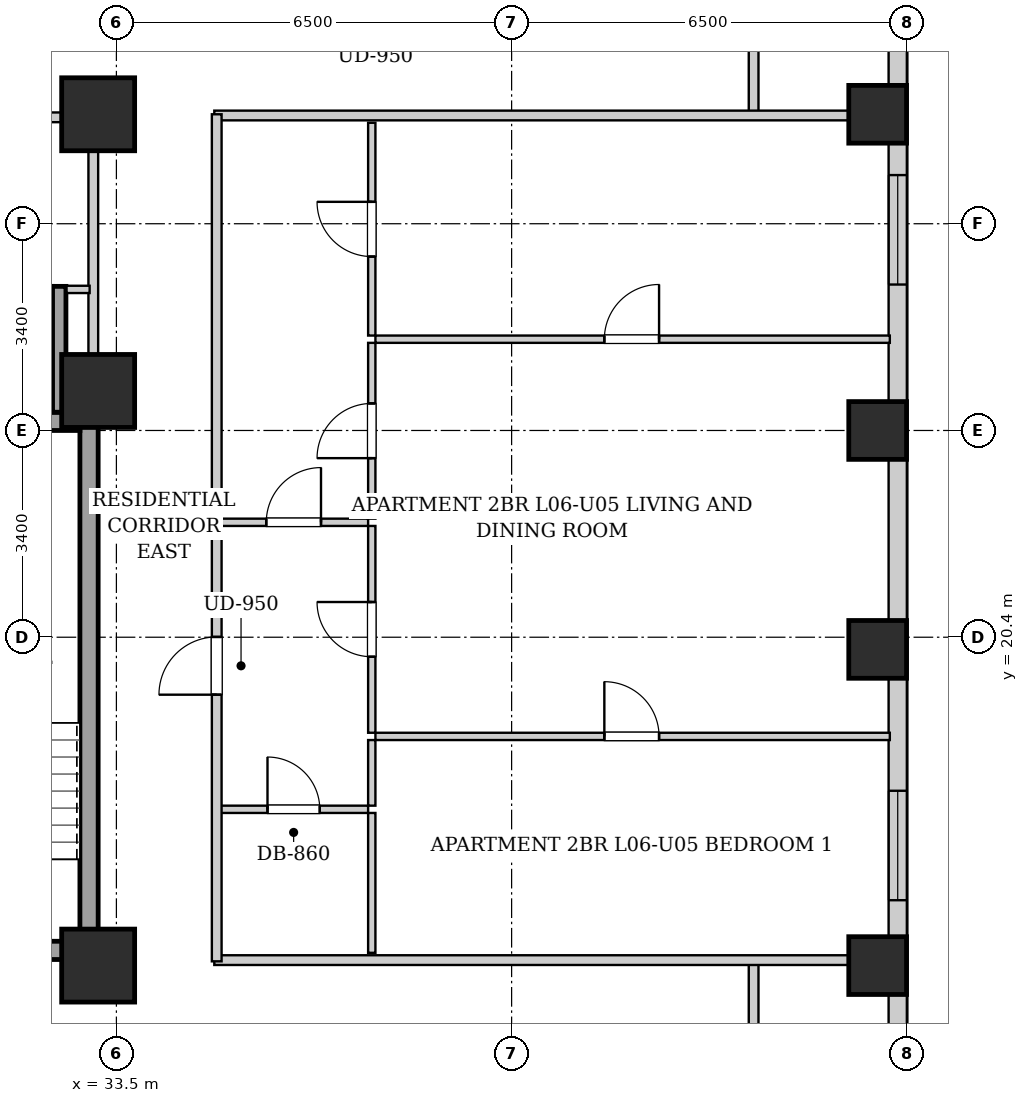
"""IFC4 building model, lengths in metres.
Left out: names, types, materials, properties, quantities, classifications, styles, units other than length and angle.
Written with IfcOpenShell. Run it as: python <this file> out.ifc"""

import sys

from ifc_helpers import new_model, si_unit, direction, frame, frame_2d, origin, origin_2d, place, context, subcontext, project, spatial, rectangle, extrude, element, fill, save


model = new_model("IFC4")
c1 = context("Model", 3, precision=1e-05, world=origin(), true_north=direction((0.0, 1.0)))
c2 = subcontext(c1, "Body", "Model", "MODEL_VIEW")
j1 = project(units=[si_unit("LENGTHUNIT", "METRE"), si_unit("PLANEANGLEUNIT", "RADIAN")], contexts=[c1])
p1 = place(None, origin())
s1 = spatial("IfcSite", under=j1, at=p1, CompositionType="ELEMENT")
p2 = place(p1, origin())
s2 = spatial("IfcBuilding", under=s1, at=p2, CompositionType="ELEMENT")
p3 = place(p2, frame((0.0, 0.0, 29.0)))
s3 = spatial("IfcBuildingStorey", under=s2, at=p3, CompositionType="ELEMENT", Elevation=29.0)
for number, where, z_axis, x_axis in (
    (1, (46.02, 15.0, 0.0), (0.0, 0.0, 1.0), (1.0, 0.0, 0.0)),
    (2, (46.02, 20.2, 0.0), (0.0, 0.0, 1.0), (1.0, 0.0, 0.0)),
    (3, (46.02, 23.8, 0.0), (0.0, 0.0, 1.0), (1.0, 0.0, 0.0)),
    (4, (46.02, 29.0, 0.0), (0.0, 0.0, 1.0), (1.0, 0.0, 0.0)),
):
    element("IfcColumn", number, at=place(p3, frame(where, z_axis=z_axis, x_axis=x_axis)), inside=s3, PredefinedType="COLUMN", context=c2, shape_type="SweptSolid", body=[
        extrude(rectangle(XDim=0.95, YDim=0.95, at=origin_2d()), origin(), (0.0, 0.0, 1.0), 3.2),
    ])
for number, where, z_axis, x_axis in (
    (5, (33.2, 15.0, 0.0), (0.0, 0.0, 1.0), (1.0, 0.0, 0.0)),
    (6, (33.2, 29.0, 0.0), (0.0, 0.0, 1.0), (1.0, 0.0, 0.0)),
    (7, (33.2, 24.45, 0.0), (0.0, 0.0, 1.0), (1.0, 0.0, 0.0)),
):
    element("IfcColumn", number, at=place(p3, frame(where, z_axis=z_axis, x_axis=x_axis)), inside=s3, PredefinedType="COLUMN", context=c2, shape_type="SweptSolid", body=[
        extrude(rectangle(XDim=1.2, YDim=1.2, at=origin_2d()), origin(), (0.0, 0.0, 1.0), 3.2),
    ])
p4 = place(p3, frame((46.35, 45.1, 0.0), z_axis=(0.0, 0.0, 1.0), x_axis=(0.0, -1.0, 0.0)))
e8 = element("IfcWall", 8, at=p4, inside=s3, PredefinedType="SOLIDWALL", context=c2, shape_type="SweptSolid", body=[
    extrude(rectangle(XDim=42.6, YDim=0.3, at=frame_2d((21.3, 0.0))), origin(), (0.0, 0.0, 1.0), 1.975),
])
p5 = place(p4, frame((37.575, 0.0, 0.55)))
e9 = element("IfcOpeningElement", 9, at=p5, cuts=e8, PredefinedType="OPENING", context=c2, shape_type="SweptSolid", body=[
    extrude(rectangle(XDim=1.8, YDim=1.2, at=frame_2d((0.9, 0.6))), frame((0.0, 0.16, 0.0), z_axis=(0.0, -1.0, 0.0), x_axis=(1.0, 0.0, 0.0)), (0.0, 0.0, 1.0), 0.32),
])
p6 = place(p4, frame((34.85, 0.0, 0.55)))
e10 = element("IfcOpeningElement", 10, at=p6, cuts=e8, PredefinedType="OPENING", context=c2, shape_type="SweptSolid", body=[
    extrude(rectangle(XDim=1.35, YDim=1.2, at=frame_2d((0.675, 0.6))), frame((0.0, 0.16, 0.0), z_axis=(0.0, -1.0, 0.0), x_axis=(1.0, 0.0, 0.0)), (0.0, 0.0, 1.0), 0.32),
])
p7 = place(p4, frame((3.665, 0.0, 0.55)))
e11 = element("IfcOpeningElement", 11, at=p7, cuts=e8, PredefinedType="OPENING", context=c2, shape_type="SweptSolid", body=[
    extrude(rectangle(XDim=1.8, YDim=1.2, at=frame_2d((0.9, 0.6))), frame((0.0, 0.16, 0.0), z_axis=(0.0, -1.0, 0.0), x_axis=(1.0, 0.0, 0.0)), (0.0, 0.0, 1.0), 0.32),
])
p8 = place(p4, frame((1.185, 0.0, 0.55)))
e12 = element("IfcOpeningElement", 12, at=p8, cuts=e8, PredefinedType="OPENING", context=c2, shape_type="SweptSolid", body=[
    extrude(rectangle(XDim=1.35, YDim=1.2, at=frame_2d((0.675, 0.6))), frame((0.0, 0.16, 0.0), z_axis=(0.0, -1.0, 0.0), x_axis=(1.0, 0.0, 0.0)), (0.0, 0.0, 1.0), 0.32),
])
p9 = place(p4, frame((27.225, 0.0, 0.55)))
e13 = element("IfcOpeningElement", 13, at=p9, cuts=e8, PredefinedType="OPENING", context=c2, shape_type="SweptSolid", body=[
    extrude(rectangle(XDim=1.8, YDim=1.2, at=frame_2d((0.9, 0.6))), frame((0.0, 0.16, 0.0), z_axis=(0.0, -1.0, 0.0), x_axis=(1.0, 0.0, 0.0)), (0.0, 0.0, 1.0), 0.32),
])
p10 = place(p4, frame((17.1, 0.0, 0.55)))
e14 = element("IfcOpeningElement", 14, at=p10, cuts=e8, PredefinedType="OPENING", context=c2, shape_type="SweptSolid", body=[
    extrude(rectangle(XDim=1.8, YDim=1.2, at=frame_2d((0.9, 0.6))), frame((0.0, 0.16, 0.0), z_axis=(0.0, -1.0, 0.0), x_axis=(1.0, 0.0, 0.0)), (0.0, 0.0, 1.0), 0.32),
])
p11 = place(p3, frame((33.05, 15.1, 0.0), z_axis=(0.0, 0.0, 1.0), x_axis=(0.0, 1.0, 0.0)))
e15 = element("IfcWall", 15, at=p11, inside=s3, PredefinedType="SHEAR", context=c2, shape_type="SweptSolid", body=[
    extrude(rectangle(XDim=9.0, YDim=0.3, at=frame_2d((4.5, 0.0))), origin(), (0.0, 0.0, 1.0), 2.94),
])
p12 = place(p3, frame((30.05, 23.95, 0.0), z_axis=(0.0, 0.0, 1.0), x_axis=(1.0, 0.0, 0.0)))
e16 = element("IfcWall", 16, at=p12, inside=s3, PredefinedType="SHEAR", context=c2, shape_type="SweptSolid", body=[
    extrude(rectangle(XDim=2.85, YDim=0.3, at=frame_2d((1.425, 0.0))), origin(), (0.0, 0.0, 1.0), 2.94),
])
p13 = place(p3, frame((30.05, 15.25, 0.0), z_axis=(0.0, 0.0, 1.0), x_axis=(1.0, 0.0, 0.0)))
e17 = element("IfcWall", 17, at=p13, inside=s3, PredefinedType="SHEAR", context=c2, shape_type="SweptSolid", body=[
    extrude(rectangle(XDim=2.85, YDim=0.3, at=frame_2d((1.425, 0.0))), origin(), (0.0, 0.0, 1.0), 2.94),
])
p14 = place(p13, frame((0.86, 0.0, 0.0)))
e18 = element("IfcOpeningElement", 18, at=p14, cuts=e17, PredefinedType="OPENING", context=c2, shape_type="SweptSolid", body=[
    extrude(rectangle(XDim=1.1, YDim=2.05, at=frame_2d((0.55, 1.025))), frame((0.0, 0.16, 0.0), z_axis=(0.0, -1.0, 0.0), x_axis=(1.0, 0.0, 0.0)), (0.0, 0.0, 1.0), 0.32),
])
p15 = place(p3, frame((32.56, 24.1, 0.0), z_axis=(0.0, 0.0, 1.0), x_axis=(0.0, 1.0, 0.0)))
e19 = element("IfcWall", 19, at=p15, inside=s3, PredefinedType="SHEAR", context=c2, shape_type="SweptSolid", body=[
    extrude(rectangle(XDim=2.07, YDim=0.22, at=frame_2d((1.035, 0.0))), origin(), (0.0, 0.0, 1.0), 2.94),
])
p16 = place(p3, frame((33.12, 24.12, 0.0), z_axis=(0.0, 0.0, 1.0), x_axis=(0.0, 1.0, 0.0)))
e20 = element("IfcWall", 20, at=p16, inside=s3, PredefinedType="PARTITIONING", context=c2, shape_type="SweptSolid", body=[
    extrude(rectangle(XDim=4.76, YDim=0.16, at=frame_2d((2.38, 0.0))), origin(), (0.0, 0.0, 1.0), 2.275),
])
p17 = place(p3, frame((32.68, 26.12, 0.0), z_axis=(0.0, 0.0, 1.0), x_axis=(1.0, 0.0, 0.0)))
e21 = element("IfcWall", 21, at=p17, inside=s3, PredefinedType="PARTITIONING", context=c2, shape_type="SweptSolid", body=[
    extrude(rectangle(XDim=0.38, YDim=0.12, at=frame_2d((0.19, 0.0))), origin(), (0.0, 0.0, 1.0), 2.94),
])
p18 = place(p3, frame((30.08, 28.95, 0.0), z_axis=(0.0, 0.0, 1.0), x_axis=(1.0, 0.0, 0.0)))
e22 = element("IfcWall", 22, at=p18, inside=s3, PredefinedType="PARTITIONING", context=c2, shape_type="SweptSolid", body=[
    extrude(rectangle(XDim=2.96, YDim=0.16, at=frame_2d((1.48, 0.0))), origin(), (0.0, 0.0, 1.0), 2.94),
])
p19 = place(p18, frame((1.045, 0.0, 0.0)))
e23 = element("IfcOpeningElement", 23, at=p19, cuts=e22, PredefinedType="OPENING", context=c2, shape_type="SweptSolid", body=[
    extrude(rectangle(XDim=0.86, YDim=2.05, at=frame_2d((0.43, 1.025))), frame((0.0, 0.09, 0.0), z_axis=(0.0, -1.0, 0.0), x_axis=(1.0, 0.0, 0.0)), (0.0, 0.0, 1.0), 0.18),
])
for number, where, z_axis, x_axis in (
    (24, (43.98, 13.35, 0.0), (0.0, 0.0, 1.0), (0.0, 1.0, 0.0)),
    (25, (43.98, 28.98, 0.0), (0.0, 0.0, 1.0), (0.0, 1.0, 0.0)),
):
    element("IfcWall", number, at=place(p3, frame(where, z_axis=z_axis, x_axis=x_axis)), inside=s3, PredefinedType="PARTITIONING", context=c2, shape_type="SweptSolid", body=[
        extrude(rectangle(XDim=1.74, YDim=0.16, at=frame_2d((0.87, 0.0))), origin(), (0.0, 0.0, 1.0), 2.94),
    ])
for number, where, z_axis, x_axis in (
    (26, (35.11, 15.09, 0.0), (0.0, 0.0, 1.0), (1.0, 0.0, 0.0)),
    (27, (35.11, 28.98, 0.0), (0.0, 0.0, 1.0), (1.0, 0.0, 0.0)),
):
    element("IfcWall", number, at=place(p3, frame(where, z_axis=z_axis, x_axis=x_axis)), inside=s3, PredefinedType="PARTITIONING", context=c2, shape_type="SweptSolid", body=[
        extrude(rectangle(XDim=11.11, YDim=0.16, at=frame_2d((5.555, 0.0))), origin(), (0.0, 0.0, 1.0), 2.155),
    ])
p20 = place(p3, frame((35.19, 22.29, 0.0), z_axis=(0.0, 0.0, 1.0), x_axis=(1.0, 0.0, 0.0)))
e28 = element("IfcWall", 28, at=p20, inside=s3, PredefinedType="PARTITIONING", context=c2, shape_type="SweptSolid", body=[
    extrude(rectangle(XDim=2.45, YDim=0.12, at=frame_2d((1.225, 0.0))), origin(), (0.0, 0.0, 1.0), 2.94),
])
p21 = place(p20, frame((0.775, 0.0, 0.0)))
e29 = element("IfcOpeningElement", 29, at=p21, cuts=e28, PredefinedType="OPENING", context=c2, shape_type="SweptSolid", body=[
    extrude(rectangle(XDim=0.9, YDim=2.05, at=frame_2d((0.45, 1.025))), frame((0.0, 0.07, 0.0), z_axis=(0.0, -1.0, 0.0), x_axis=(1.0, 0.0, 0.0)), (0.0, 0.0, 1.0), 0.14),
])
p22 = place(p3, frame((37.7, 22.35, 0.0), z_axis=(0.0, 0.0, 1.0), x_axis=(0.0, 1.0, 0.0)))
e30 = element("IfcWall", 30, at=p22, inside=s3, PredefinedType="PARTITIONING", context=c2, shape_type="SweptSolid", body=[
    extrude(rectangle(XDim=2.891, YDim=0.12, at=frame_2d((1.445, 0.0))), origin(), (0.0, 0.0, 1.0), 2.94),
])
p23 = place(p22, frame((0.995, 0.0, 0.0)))
e31 = element("IfcOpeningElement", 31, at=p23, cuts=e30, PredefinedType="OPENING", context=c2, shape_type="SweptSolid", body=[
    extrude(rectangle(XDim=0.9, YDim=2.05, at=frame_2d((0.45, 1.025))), frame((0.0, 0.07, 0.0), z_axis=(0.0, -1.0, 0.0), x_axis=(1.0, 0.0, 0.0)), (0.0, 0.0, 1.0), 0.14),
])
p24 = place(p3, frame((37.7, 25.361, 0.0), z_axis=(0.0, 0.0, 1.0), x_axis=(0.0, 1.0, 0.0)))
e32 = element("IfcWall", 32, at=p24, inside=s3, PredefinedType="PARTITIONING", context=c2, shape_type="SweptSolid", body=[
    extrude(rectangle(XDim=3.499, YDim=0.12, at=frame_2d((1.75, 0.0))), origin(), (0.0, 0.0, 1.0), 2.94),
])
p25 = place(p24, frame((1.299, 0.0, 0.0)))
e33 = element("IfcOpeningElement", 33, at=p25, cuts=e32, PredefinedType="OPENING", context=c2, shape_type="SweptSolid", body=[
    extrude(rectangle(XDim=0.9, YDim=2.05, at=frame_2d((0.45, 1.025))), frame((0.0, 0.07, 0.0), z_axis=(0.0, -1.0, 0.0), x_axis=(1.0, 0.0, 0.0)), (0.0, 0.0, 1.0), 0.14),
])
p26 = place(p3, frame((35.19, 17.57, 0.0), z_axis=(0.0, 0.0, 1.0), x_axis=(1.0, 0.0, 0.0)))
e34 = element("IfcWall", 34, at=p26, inside=s3, PredefinedType="PARTITIONING", context=c2, shape_type="SweptSolid", body=[
    extrude(rectangle(XDim=2.45, YDim=0.12, at=frame_2d((1.225, 0.0))), origin(), (0.0, 0.0, 1.0), 2.94),
])
p27 = place(p26, frame((0.795, 0.0, 0.0)))
e35 = element("IfcOpeningElement", 35, at=p27, cuts=e34, PredefinedType="OPENING", context=c2, shape_type="SweptSolid", body=[
    extrude(rectangle(XDim=0.86, YDim=2.05, at=frame_2d((0.43, 1.025))), frame((0.0, 0.07, 0.0), z_axis=(0.0, -1.0, 0.0), x_axis=(1.0, 0.0, 0.0)), (0.0, 0.0, 1.0), 0.14),
])
p28 = place(p3, frame((37.7, 15.21, 0.0), z_axis=(0.0, 0.0, 1.0), x_axis=(0.0, 1.0, 0.0)))
e36 = element("IfcWall", 36, at=p28, inside=s3, PredefinedType="PARTITIONING", context=c2, shape_type="SweptSolid", body=[
    extrude(rectangle(XDim=2.3, YDim=0.12, at=frame_2d((1.15, 0.0))), origin(), (0.0, 0.0, 1.0), 2.94),
])
p29 = place(p3, frame((37.7, 17.63, 0.0), z_axis=(0.0, 0.0, 1.0), x_axis=(0.0, 1.0, 0.0)))
e37 = element("IfcWall", 37, at=p29, inside=s3, PredefinedType="PARTITIONING", context=c2, shape_type="SweptSolid", body=[
    extrude(rectangle(XDim=1.079, YDim=0.12, at=frame_2d((0.54, 0.0))), origin(), (0.0, 0.0, 1.0), 2.94),
])
p30 = place(p3, frame((37.7, 18.829, 0.0), z_axis=(0.0, 0.0, 1.0), x_axis=(0.0, 1.0, 0.0)))
e38 = element("IfcWall", 38, at=p30, inside=s3, PredefinedType="PARTITIONING", context=c2, shape_type="SweptSolid", body=[
    extrude(rectangle(XDim=3.401, YDim=0.12, at=frame_2d((1.7, 0.0))), origin(), (0.0, 0.0, 1.0), 2.94),
])
p31 = place(p30, frame((1.25, 0.0, 0.0)))
e39 = element("IfcOpeningElement", 39, at=p31, cuts=e38, PredefinedType="OPENING", context=c2, shape_type="SweptSolid", body=[
    extrude(rectangle(XDim=0.9, YDim=2.05, at=frame_2d((0.45, 1.025))), frame((0.0, 0.07, 0.0), z_axis=(0.0, -1.0, 0.0), x_axis=(1.0, 0.0, 0.0)), (0.0, 0.0, 1.0), 0.14),
])
p32 = place(p3, frame((37.76, 18.769, 0.0), z_axis=(0.0, 0.0, 1.0), x_axis=(1.0, 0.0, 0.0)))
e40 = element("IfcWall", 40, at=p32, inside=s3, PredefinedType="PARTITIONING", context=c2, shape_type="SweptSolid", body=[
    extrude(rectangle(XDim=8.46, YDim=0.12, at=frame_2d((4.23, 0.0))), origin(), (0.0, 0.0, 1.0), 2.94),
])
p33 = place(p32, frame((3.765, 0.0, 0.0)))
e41 = element("IfcOpeningElement", 41, at=p33, cuts=e40, PredefinedType="OPENING", context=c2, shape_type="SweptSolid", body=[
    extrude(rectangle(XDim=0.9, YDim=2.05, at=frame_2d((0.45, 1.025))), frame((0.0, 0.07, 0.0), z_axis=(0.0, -1.0, 0.0), x_axis=(1.0, 0.0, 0.0)), (0.0, 0.0, 1.0), 0.14),
])
p34 = place(p3, frame((37.76, 25.301, 0.0), z_axis=(0.0, 0.0, 1.0), x_axis=(1.0, 0.0, 0.0)))
e42 = element("IfcWall", 42, at=p34, inside=s3, PredefinedType="PARTITIONING", context=c2, shape_type="SweptSolid", body=[
    extrude(rectangle(XDim=8.46, YDim=0.12, at=frame_2d((4.23, 0.0))), origin(), (0.0, 0.0, 1.0), 2.94),
])
p35 = place(p34, frame((3.765, 0.0, 0.0)))
e43 = element("IfcOpeningElement", 43, at=p35, cuts=e42, PredefinedType="OPENING", context=c2, shape_type="SweptSolid", body=[
    extrude(rectangle(XDim=0.9, YDim=2.05, at=frame_2d((0.45, 1.025))), frame((0.0, 0.07, 0.0), z_axis=(0.0, -1.0, 0.0), x_axis=(1.0, 0.0, 0.0)), (0.0, 0.0, 1.0), 0.14),
])
p36 = place(p3, frame((35.15, 15.07, 0.0), z_axis=(0.0, 0.0, 1.0), x_axis=(0.0, 1.0, 0.0)))
e44 = element("IfcWall", 44, at=p36, inside=s3, PredefinedType="PARTITIONING", context=c2, shape_type="SweptSolid", body=[
    extrude(rectangle(XDim=13.93, YDim=0.16, at=frame_2d((6.965, 0.0))), origin(), (0.0, 0.0, 1.0), 2.94),
])
p37 = place(p36, frame((4.385, 0.0, 0.0)))
e45 = element("IfcOpeningElement", 45, at=p37, cuts=e44, PredefinedType="OPENING", context=c2, shape_type="SweptSolid", body=[
    extrude(rectangle(XDim=0.95, YDim=2.1, at=frame_2d((0.475, 1.05))), frame((0.0, 0.09, 0.0), z_axis=(0.0, -1.0, 0.0), x_axis=(1.0, 0.0, 0.0)), (0.0, 0.0, 1.0), 0.18),
])
p38 = place(p21, origin())
e46 = element("IfcDoor", 46, at=p38, inside=s3, OperationType="SINGLE_SWING_RIGHT", PredefinedType="DOOR", context=c2, shape_type="SweptSolid", body=[
    extrude(rectangle(XDim=0.9, YDim=2.05, at=frame_2d((0.45, 1.025))), frame((0.0, 0.025, 0.0), z_axis=(0.0, -1.0, 0.0), x_axis=(1.0, 0.0, 0.0)), (0.0, 0.0, 1.0), 0.05),
])
fill(e29, e46)
p39 = place(p23, origin())
e47 = element("IfcDoor", 47, at=p39, inside=s3, OperationType="SINGLE_SWING_LEFT", PredefinedType="DOOR", context=c2, shape_type="SweptSolid", body=[
    extrude(rectangle(XDim=0.9, YDim=2.05, at=frame_2d((0.45, 1.025))), frame((0.0, 0.025, 0.0), z_axis=(0.0, -1.0, 0.0), x_axis=(1.0, 0.0, 0.0)), (0.0, 0.0, 1.0), 0.05),
])
fill(e31, e47)
p40 = place(p25, origin())
e48 = element("IfcDoor", 48, at=p40, inside=s3, OperationType="SINGLE_SWING_RIGHT", PredefinedType="DOOR", context=c2, shape_type="SweptSolid", body=[
    extrude(rectangle(XDim=0.9, YDim=2.05, at=frame_2d((0.45, 1.025))), frame((0.0, 0.025, 0.0), z_axis=(0.0, -1.0, 0.0), x_axis=(1.0, 0.0, 0.0)), (0.0, 0.0, 1.0), 0.05),
])
fill(e33, e48)
p41 = place(p27, origin())
e49 = element("IfcDoor", 49, at=p41, inside=s3, OperationType="SINGLE_SWING_LEFT", PredefinedType="DOOR", context=c2, shape_type="SweptSolid", body=[
    extrude(rectangle(XDim=0.86, YDim=2.05, at=frame_2d((0.43, 1.025))), frame((0.0, 0.025, 0.0), z_axis=(0.0, -1.0, 0.0), x_axis=(1.0, 0.0, 0.0)), (0.0, 0.0, 1.0), 0.05),
])
fill(e35, e49)
p42 = place(p31, origin())
e50 = element("IfcDoor", 50, at=p42, inside=s3, OperationType="SINGLE_SWING_RIGHT", PredefinedType="DOOR", context=c2, shape_type="SweptSolid", body=[
    extrude(rectangle(XDim=0.9, YDim=2.05, at=frame_2d((0.45, 1.025))), frame((0.0, 0.025, 0.0), z_axis=(0.0, -1.0, 0.0), x_axis=(1.0, 0.0, 0.0)), (0.0, 0.0, 1.0), 0.05),
])
fill(e39, e50)
p43 = place(p33, origin())
e51 = element("IfcDoor", 51, at=p43, inside=s3, OperationType="SINGLE_SWING_LEFT", PredefinedType="DOOR", context=c2, shape_type="SweptSolid", body=[
    extrude(rectangle(XDim=0.9, YDim=2.05, at=frame_2d((0.45, 1.025))), frame((0.0, 0.025, 0.0), z_axis=(0.0, -1.0, 0.0), x_axis=(1.0, 0.0, 0.0)), (0.0, 0.0, 1.0), 0.05),
])
fill(e41, e51)
p44 = place(p35, origin())
e52 = element("IfcDoor", 52, at=p44, inside=s3, OperationType="SINGLE_SWING_RIGHT", PredefinedType="DOOR", context=c2, shape_type="SweptSolid", body=[
    extrude(rectangle(XDim=0.9, YDim=2.05, at=frame_2d((0.45, 1.025))), frame((0.0, 0.025, 0.0), z_axis=(0.0, -1.0, 0.0), x_axis=(1.0, 0.0, 0.0)), (0.0, 0.0, 1.0), 0.05),
])
fill(e43, e52)
p45 = place(p37, origin())
e53 = element("IfcDoor", 53, at=p45, inside=s3, OperationType="SINGLE_SWING_LEFT", PredefinedType="DOOR", context=c2, shape_type="SweptSolid", body=[
    extrude(rectangle(XDim=0.95, YDim=2.1, at=frame_2d((0.475, 1.05))), frame((0.0, 0.025, 0.0), z_axis=(0.0, -1.0, 0.0), x_axis=(1.0, 0.0, 0.0)), (0.0, 0.0, 1.0), 0.05),
])
fill(e45, e53)
p46 = place(p9, origin())
e54 = element("IfcWindow", 54, at=p46, inside=s3, PartitioningType="DOUBLE_PANEL_VERTICAL", PredefinedType="WINDOW", context=c2, shape_type="SweptSolid", body=[
    extrude(rectangle(XDim=1.8, YDim=1.2, at=frame_2d((0.9, 0.6))), frame((0.0, 0.03, 0.0), z_axis=(0.0, -1.0, 0.0), x_axis=(1.0, 0.0, 0.0)), (0.0, 0.0, 1.0), 0.06),
])
fill(e13, e54)
p47 = place(p10, origin())
e55 = element("IfcWindow", 55, at=p47, inside=s3, PartitioningType="DOUBLE_PANEL_VERTICAL", PredefinedType="WINDOW", context=c2, shape_type="SweptSolid", body=[
    extrude(rectangle(XDim=1.8, YDim=1.2, at=frame_2d((0.9, 0.6))), frame((0.0, 0.03, 0.0), z_axis=(0.0, -1.0, 0.0), x_axis=(1.0, 0.0, 0.0)), (0.0, 0.0, 1.0), 0.06),
])
fill(e14, e55)
save(model, sys.argv[1])
